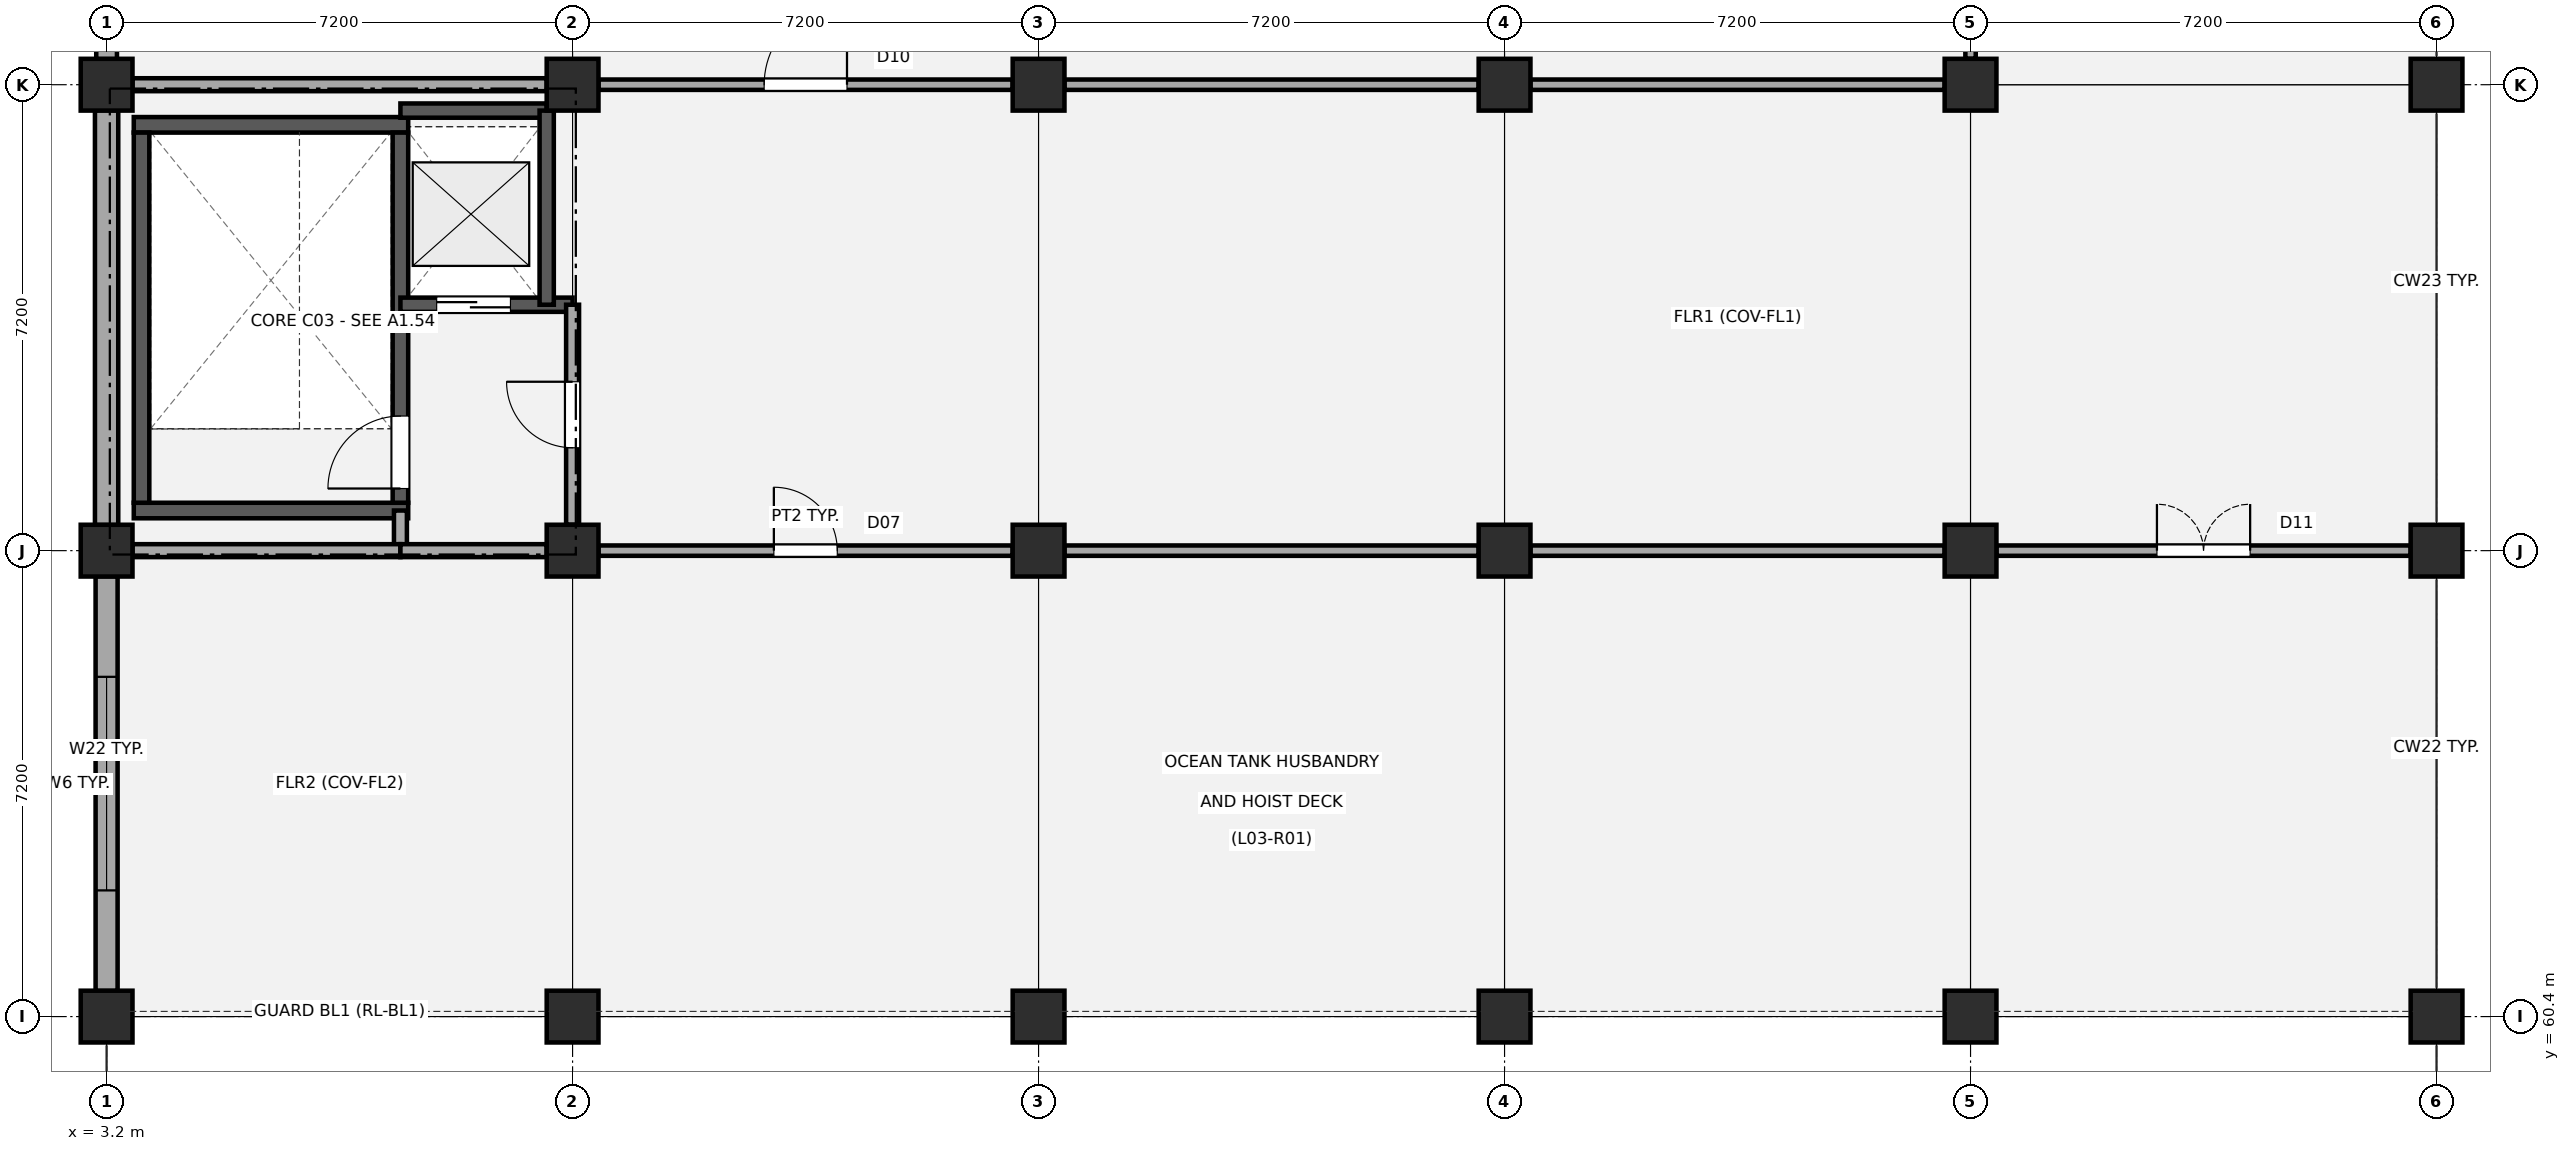
"""IFC4 building model, lengths in metres.
Left out: names, types, materials, properties, quantities, classifications, styles, units other than length and angle.
Written with IfcOpenShell. Run it as: python <this file> out.ifc"""

import sys

from ifc_helpers import new_model, si_unit, direction, frame, frame_2d, origin, origin_2d, place, context, subcontext, project, spatial, rectangle, extrude, element, fill, save


model = new_model("IFC4")
c1 = context("Model", 3, precision=1e-05, world=origin(), true_north=direction((0.0, 1.0)))
c2 = subcontext(c1, "Body", "Model", "MODEL_VIEW")
j1 = project(units=[si_unit("LENGTHUNIT", "METRE"), si_unit("PLANEANGLEUNIT", "RADIAN")], contexts=[c1])
p1 = place(None, origin())
s1 = spatial("IfcSite", under=j1, at=p1, CompositionType="ELEMENT")
p2 = place(p1, origin())
s2 = spatial("IfcBuilding", under=s1, at=p2, CompositionType="ELEMENT")
p3 = place(p2, frame((0.0, 0.0, 13.5)))
s3 = spatial("IfcBuildingStorey", under=s2, at=p3, CompositionType="ELEMENT", Elevation=13.5)
for number, where, z_axis, x_axis in (
    (1, (3.2, 60.4, 0.0), (0.0, 0.0, 1.0), (1.0, 0.0, 0.0)),
    (2, (3.2, 67.6, 0.0), (0.0, 0.0, 1.0), (1.0, 0.0, 0.0)),
    (3, (3.2, 74.8, 0.0), (0.0, 0.0, 1.0), (1.0, 0.0, 0.0)),
    (4, (10.4, 60.4, 0.0), (0.0, 0.0, 1.0), (1.0, 0.0, 0.0)),
    (5, (10.4, 67.6, 0.0), (0.0, 0.0, 1.0), (1.0, 0.0, 0.0)),
    (6, (10.4, 74.8, 0.0), (0.0, 0.0, 1.0), (1.0, 0.0, 0.0)),
    (7, (17.6, 60.4, 0.0), (0.0, 0.0, 1.0), (1.0, 0.0, 0.0)),
    (8, (17.6, 67.6, 0.0), (0.0, 0.0, 1.0), (1.0, 0.0, 0.0)),
    (9, (17.6, 74.8, 0.0), (0.0, 0.0, 1.0), (1.0, 0.0, 0.0)),
    (10, (24.8, 60.4, 0.0), (0.0, 0.0, 1.0), (1.0, 0.0, 0.0)),
    (11, (24.8, 67.6, 0.0), (0.0, 0.0, 1.0), (1.0, 0.0, 0.0)),
    (12, (24.8, 74.8, 0.0), (0.0, 0.0, 1.0), (1.0, 0.0, 0.0)),
    (13, (32.0, 60.4, 0.0), (0.0, 0.0, 1.0), (1.0, 0.0, 0.0)),
    (14, (32.0, 67.6, 0.0), (0.0, 0.0, 1.0), (1.0, 0.0, 0.0)),
    (15, (32.0, 74.8, 0.0), (0.0, 0.0, 1.0), (1.0, 0.0, 0.0)),
    (16, (39.2, 60.4, 0.0), (0.0, 0.0, 1.0), (1.0, 0.0, 0.0)),
    (17, (39.2, 67.6, 0.0), (0.0, 0.0, 1.0), (1.0, 0.0, 0.0)),
    (18, (39.2, 74.8, 0.0), (0.0, 0.0, 1.0), (1.0, 0.0, 0.0)),
):
    element("IfcColumn", number, at=place(p3, frame(where, z_axis=z_axis, x_axis=x_axis)), inside=s3, PredefinedType="COLUMN", context=c2, shape_type="SweptSolid", body=[
        extrude(rectangle(XDim=0.8, YDim=0.8, at=origin_2d()), origin(), (0.0, 0.0, 1.0), 4.14),
    ])
p4 = place(p3, frame((3.2, 60.795, 0.0), z_axis=(0.0, 0.0, 1.0), x_axis=(0.0, 1.0, 0.0)))
e19 = element("IfcWall", 19, at=p4, inside=s3, PredefinedType="STANDARD", context=c2, shape_type="SweptSolid", body=[
    extrude(rectangle(XDim=6.41, YDim=0.34, at=frame_2d((3.205, 0.0))), origin(), (0.0, 0.0, 1.0), 3.53),
])
p5 = place(p4, frame((1.555, 0.0, 0.95)))
e20 = element("IfcOpeningElement", 20, at=p5, cuts=e19, PredefinedType="OPENING", context=c2, shape_type="SweptSolid", body=[
    extrude(rectangle(XDim=3.3, YDim=1.95, at=frame_2d((1.65, 0.975))), frame((0.0, 0.18, 0.0), z_axis=(0.0, -1.0, 0.0), x_axis=(1.0, 0.0, 0.0)), (0.0, 0.0, 1.0), 0.36),
])
p6 = place(p3, frame((3.2, 67.995, 0.0), z_axis=(0.0, 0.0, 1.0), x_axis=(0.0, 1.0, 0.0)))
e21 = element("IfcWall", 21, at=p6, inside=s3, PredefinedType="STANDARD", context=c2, shape_type="SweptSolid", body=[
    extrude(rectangle(XDim=6.41, YDim=0.36, at=frame_2d((3.205, 0.0))), origin(), (0.0, 0.0, 1.0), 3.53),
])
p7 = place(p3, frame((3.2, 75.195, 0.0), z_axis=(0.0, 0.0, 1.0), x_axis=(0.0, 1.0, 0.0)))
e22 = element("IfcWall", 22, at=p7, inside=s3, PredefinedType="STANDARD", context=c2, shape_type="SweptSolid", body=[
    extrude(rectangle(XDim=6.41, YDim=0.32, at=frame_2d((3.205, 0.0))), origin(), (0.0, 0.0, 1.0), 3.53),
])
p8 = place(p7, frame((1.48, 0.0, 0.95)))
e23 = element("IfcOpeningElement", 23, at=p8, cuts=e22, PredefinedType="OPENING", context=c2, shape_type="SweptSolid", body=[
    extrude(rectangle(XDim=3.45, YDim=2.0, at=frame_2d((1.725, 1.0))), frame((0.0, 0.17, 0.0), z_axis=(0.0, -1.0, 0.0), x_axis=(1.0, 0.0, 0.0)), (0.0, 0.0, 1.0), 0.34),
])
for number, where, z_axis, x_axis in (
    (24, (3.62, 68.22, 0.0), (0.0, 0.0, 1.0), (1.0, 0.0, 0.0)),
    (25, (3.62, 74.18, 0.0), (0.0, 0.0, 1.0), (1.0, 0.0, 0.0)),
):
    element("IfcWall", number, at=place(p3, frame(where, z_axis=z_axis, x_axis=x_axis)), inside=s3, PredefinedType="SHEAR", context=c2, shape_type="SweptSolid", body=[
        extrude(rectangle(XDim=4.24, YDim=0.24, at=frame_2d((2.12, 0.0))), origin(), (0.0, 0.0, 1.0), 3.84),
    ])
p9 = place(p3, frame((3.74, 68.34, 0.0), z_axis=(0.0, 0.0, 1.0), x_axis=(0.0, 1.0, 0.0)))
e26 = element("IfcWall", 26, at=p9, inside=s3, PredefinedType="SHEAR", context=c2, shape_type="SweptSolid", body=[
    extrude(rectangle(XDim=5.72, YDim=0.24, at=frame_2d((2.86, 0.0))), origin(), (0.0, 0.0, 1.0), 3.84),
])
p10 = place(p3, frame((7.74, 68.34, 0.0), z_axis=(0.0, 0.0, 1.0), x_axis=(0.0, 1.0, 0.0)))
e27 = element("IfcWall", 27, at=p10, inside=s3, PredefinedType="SHEAR", context=c2, shape_type="SweptSolid", body=[
    extrude(rectangle(XDim=5.72, YDim=0.24, at=frame_2d((2.86, 0.0))), origin(), (0.0, 0.0, 1.0), 3.84),
])
p11 = place(p10, frame((0.22, 0.0, 0.0)))
e28 = element("IfcOpeningElement", 28, at=p11, cuts=e27, PredefinedType="OPENING", context=c2, shape_type="SweptSolid", body=[
    extrude(rectangle(XDim=1.12, YDim=2.15, at=frame_2d((0.56, 1.075))), frame((0.0, 0.13, 0.0), z_axis=(0.0, -1.0, 0.0), x_axis=(1.0, 0.0, 0.0)), (0.0, 0.0, 1.0), 0.26),
])
p12 = place(p3, frame((7.74, 71.4, 0.0), z_axis=(0.0, 0.0, 1.0), x_axis=(1.0, 0.0, 0.0)))
e29 = element("IfcWall", 29, at=p12, inside=s3, PredefinedType="SHEAR", context=c2, shape_type="SweptSolid", body=[
    extrude(rectangle(XDim=2.66, YDim=0.22, at=frame_2d((1.33, 0.0))), origin(), (0.0, 0.0, 1.0), 3.84),
])
p13 = place(p12, frame((0.56, 0.0, 0.0)))
e30 = element("IfcOpeningElement", 30, at=p13, cuts=e29, PredefinedType="OPENING", context=c2, shape_type="SweptSolid", body=[
    extrude(rectangle(XDim=1.14, YDim=2.15, at=frame_2d((0.57, 1.075))), frame((0.0, 0.12, 0.0), z_axis=(0.0, -1.0, 0.0), x_axis=(1.0, 0.0, 0.0)), (0.0, 0.0, 1.0), 0.24),
])
p14 = place(p3, frame((7.74, 74.4, 0.0), z_axis=(0.0, 0.0, 1.0), x_axis=(1.0, 0.0, 0.0)))
e31 = element("IfcWall", 31, at=p14, inside=s3, PredefinedType="SHEAR", context=c2, shape_type="SweptSolid", body=[
    extrude(rectangle(XDim=2.26, YDim=0.22, at=frame_2d((1.13, 0.0))), origin(), (0.0, 0.0, 1.0), 3.84),
])
p15 = place(p3, frame((10.0, 71.4, 0.0), z_axis=(0.0, 0.0, 1.0), x_axis=(0.0, 1.0, 0.0)))
e32 = element("IfcWall", 32, at=p15, inside=s3, PredefinedType="SHEAR", context=c2, shape_type="SweptSolid", body=[
    extrude(rectangle(XDim=3.0, YDim=0.22, at=frame_2d((1.5, 0.0))), origin(), (0.0, 0.0, 1.0), 3.84),
])
p16 = place(p3, frame((7.74, 67.6, 0.0), z_axis=(0.0, 0.0, 1.0), x_axis=(0.0, 1.0, 0.0)))
e33 = element("IfcWall", 33, at=p16, inside=s3, PredefinedType="PARTITIONING", context=c2, shape_type="SweptSolid", body=[
    extrude(rectangle(XDim=0.62, YDim=0.2, at=frame_2d((0.31, 0.0))), origin(), (0.0, 0.0, 1.0), 3.82),
])
p17 = place(p3, frame((10.4, 68.0, 0.0), z_axis=(0.0, 0.0, 1.0), x_axis=(0.0, 1.0, 0.0)))
e34 = element("IfcWall", 34, at=p17, inside=s3, PredefinedType="PARTITIONING", context=c2, shape_type="SweptSolid", body=[
    extrude(rectangle(XDim=3.4, YDim=0.2, at=frame_2d((1.7, 0.0))), origin(), (0.0, 0.0, 1.0), 3.82),
])
p18 = place(p17, frame((1.19, 0.0, 0.0)))
e35 = element("IfcOpeningElement", 35, at=p18, cuts=e34, PredefinedType="OPENING", context=c2, shape_type="SweptSolid", body=[
    extrude(rectangle(XDim=1.02, YDim=2.15, at=frame_2d((0.51, 1.075))), frame((0.0, 0.11, 0.0), z_axis=(0.0, -1.0, 0.0), x_axis=(1.0, 0.0, 0.0)), (0.0, 0.0, 1.0), 0.22),
])
p19 = place(p3, frame((3.6, 67.6, 0.0), z_axis=(0.0, 0.0, 1.0), x_axis=(1.0, 0.0, 0.0)))
e36 = element("IfcWall", 36, at=p19, inside=s3, PredefinedType="PARTITIONING", context=c2, shape_type="SweptSolid", body=[
    extrude(rectangle(XDim=4.14, YDim=0.2, at=frame_2d((2.07, 0.0))), origin(), (0.0, 0.0, 1.0), 3.82),
])
p20 = place(p3, frame((7.74, 67.6, 0.0), z_axis=(0.0, 0.0, 1.0), x_axis=(1.0, 0.0, 0.0)))
e37 = element("IfcWall", 37, at=p20, inside=s3, PredefinedType="PARTITIONING", context=c2, shape_type="SweptSolid", body=[
    extrude(rectangle(XDim=2.26, YDim=0.2, at=frame_2d((1.13, 0.0))), origin(), (0.0, 0.0, 1.0), 3.82),
])
p21 = place(p3, frame((3.6, 74.8, 0.0), z_axis=(0.0, 0.0, 1.0), x_axis=(1.0, 0.0, 0.0)))
e38 = element("IfcWall", 38, at=p21, inside=s3, PredefinedType="PARTITIONING", context=c2, shape_type="SweptSolid", body=[
    extrude(rectangle(XDim=6.4, YDim=0.2, at=frame_2d((3.2, 0.0))), origin(), (0.0, 0.0, 1.0), 3.82),
])
p22 = place(p3, frame((10.8, 67.6, 0.0), z_axis=(0.0, 0.0, 1.0), x_axis=(1.0, 0.0, 0.0)))
e39 = element("IfcWall", 39, at=p22, inside=s3, PredefinedType="PARTITIONING", context=c2, shape_type="SweptSolid", body=[
    extrude(rectangle(XDim=6.4, YDim=0.16, at=frame_2d((3.2, 0.0))), origin(), (0.0, 0.0, 1.0), 3.82),
])
p23 = place(p22, frame((2.71, 0.0, 0.0)))
e40 = element("IfcOpeningElement", 40, at=p23, cuts=e39, PredefinedType="OPENING", context=c2, shape_type="SweptSolid", body=[
    extrude(rectangle(XDim=0.98, YDim=2.12, at=frame_2d((0.49, 1.06))), frame((0.0, 0.09, 0.0), z_axis=(0.0, -1.0, 0.0), x_axis=(1.0, 0.0, 0.0)), (0.0, 0.0, 1.0), 0.18),
])
p24 = place(p3, frame((10.8, 74.8, 0.0), z_axis=(0.0, 0.0, 1.0), x_axis=(1.0, 0.0, 0.0)))
e41 = element("IfcWall", 41, at=p24, inside=s3, PredefinedType="PARTITIONING", context=c2, shape_type="SweptSolid", body=[
    extrude(rectangle(XDim=6.4, YDim=0.16, at=frame_2d((3.2, 0.0))), origin(), (0.0, 0.0, 1.0), 3.82),
])
p25 = place(p24, frame((2.56, 0.0, 0.0)))
e42 = element("IfcOpeningElement", 42, at=p25, cuts=e41, PredefinedType="OPENING", context=c2, shape_type="SweptSolid", body=[
    extrude(rectangle(XDim=1.28, YDim=2.2, at=frame_2d((0.64, 1.1))), frame((0.0, 0.09, 0.0), z_axis=(0.0, -1.0, 0.0), x_axis=(1.0, 0.0, 0.0)), (0.0, 0.0, 1.0), 0.18),
])
for number, where, z_axis, x_axis in (
    (43, (18.0, 67.6, 0.0), (0.0, 0.0, 1.0), (1.0, 0.0, 0.0)),
    (44, (18.0, 74.8, 0.0), (0.0, 0.0, 1.0), (1.0, 0.0, 0.0)),
):
    element("IfcWall", number, at=place(p3, frame(where, z_axis=z_axis, x_axis=x_axis)), inside=s3, PredefinedType="PARTITIONING", context=c2, shape_type="SweptSolid", body=[
        extrude(rectangle(XDim=6.4, YDim=0.16, at=frame_2d((3.2, 0.0))), origin(), (0.0, 0.0, 1.0), 3.82),
    ])
for number, where, z_axis, x_axis in (
    (45, (25.2, 67.6, 0.0), (0.0, 0.0, 1.0), (1.0, 0.0, 0.0)),
    (46, (25.2, 74.8, 0.0), (0.0, 0.0, 1.0), (1.0, 0.0, 0.0)),
):
    element("IfcWall", number, at=place(p3, frame(where, z_axis=z_axis, x_axis=x_axis)), inside=s3, PredefinedType="PARTITIONING", context=c2, shape_type="SweptSolid", body=[
        extrude(rectangle(XDim=6.4, YDim=0.16, at=frame_2d((3.2, 0.0))), origin(), (0.0, 0.0, 1.0), 3.82),
    ])
p26 = place(p3, frame((32.0, 75.2, 0.0), z_axis=(0.0, 0.0, 1.0), x_axis=(0.0, 1.0, 0.0)))
e47 = element("IfcWall", 47, at=p26, inside=s3, PredefinedType="PARTITIONING", context=c2, shape_type="SweptSolid", body=[
    extrude(rectangle(XDim=6.4, YDim=0.16, at=frame_2d((3.2, 0.0))), origin(), (0.0, 0.0, 1.0), 3.82),
])
p27 = place(p26, frame((2.71, 0.0, 0.0)))
e48 = element("IfcOpeningElement", 48, at=p27, cuts=e47, PredefinedType="OPENING", context=c2, shape_type="SweptSolid", body=[
    extrude(rectangle(XDim=0.98, YDim=2.12, at=frame_2d((0.49, 1.06))), frame((0.0, 0.09, 0.0), z_axis=(0.0, -1.0, 0.0), x_axis=(1.0, 0.0, 0.0)), (0.0, 0.0, 1.0), 0.18),
])
p28 = place(p3, frame((32.4, 67.6, 0.0), z_axis=(0.0, 0.0, 1.0), x_axis=(1.0, 0.0, 0.0)))
e49 = element("IfcWall", 49, at=p28, inside=s3, PredefinedType="PARTITIONING", context=c2, shape_type="SweptSolid", body=[
    extrude(rectangle(XDim=6.4, YDim=0.16, at=frame_2d((3.2, 0.0))), origin(), (0.0, 0.0, 1.0), 3.82),
])
p29 = place(p28, frame((2.48, 0.0, 0.0)))
e50 = element("IfcOpeningElement", 50, at=p29, cuts=e49, PredefinedType="OPENING", context=c2, shape_type="SweptSolid", body=[
    extrude(rectangle(XDim=1.44, YDim=2.2, at=frame_2d((0.72, 1.1))), frame((0.0, 0.09, 0.0), z_axis=(0.0, -1.0, 0.0), x_axis=(1.0, 0.0, 0.0)), (0.0, 0.0, 1.0), 0.18),
])
p30 = place(p5, origin())
e51 = element("IfcWindow", 51, at=p30, inside=s3, PartitioningType="SINGLE_PANEL", PredefinedType="WINDOW", context=c2, shape_type="SweptSolid", body=[
    extrude(rectangle(XDim=3.3, YDim=1.95, at=frame_2d((1.65, 0.975))), frame((0.0, 0.03, 0.0), z_axis=(0.0, -1.0, 0.0), x_axis=(1.0, 0.0, 0.0)), (0.0, 0.0, 1.0), 0.06),
])
fill(e20, e51)
p31 = place(p11, origin())
e52 = element("IfcDoor", 52, at=p31, inside=s3, OperationType="SINGLE_SWING_LEFT", PredefinedType="DOOR", context=c2, shape_type="SweptSolid", body=[
    extrude(rectangle(XDim=1.12, YDim=2.15, at=frame_2d((0.56, 1.075))), frame((0.0, 0.025, 0.0), z_axis=(0.0, -1.0, 0.0), x_axis=(1.0, 0.0, 0.0)), (0.0, 0.0, 1.0), 0.05),
])
fill(e28, e52)
p32 = place(p13, origin())
e53 = element("IfcDoor", 53, at=p32, inside=s3, OperationType="SLIDING_TO_LEFT", PredefinedType="DOOR", context=c2, shape_type="SweptSolid", body=[
    extrude(rectangle(XDim=1.14, YDim=2.15, at=frame_2d((0.57, 1.075))), frame((0.0, 0.025, 0.0), z_axis=(0.0, -1.0, 0.0), x_axis=(1.0, 0.0, 0.0)), (0.0, 0.0, 1.0), 0.05),
])
fill(e30, e53)
p33 = place(p18, origin())
e54 = element("IfcDoor", 54, at=p33, inside=s3, OperationType="SINGLE_SWING_RIGHT", PredefinedType="DOOR", context=c2, shape_type="SweptSolid", body=[
    extrude(rectangle(XDim=1.02, YDim=2.15, at=frame_2d((0.51, 1.075))), frame((0.0, 0.025, 0.0), z_axis=(0.0, -1.0, 0.0), x_axis=(1.0, 0.0, 0.0)), (0.0, 0.0, 1.0), 0.05),
])
fill(e35, e54)
p34 = place(p23, origin())
e55 = element("IfcDoor", 55, at=p34, inside=s3, OperationType="SINGLE_SWING_LEFT", PredefinedType="DOOR", context=c2, shape_type="SweptSolid", body=[
    extrude(rectangle(XDim=0.98, YDim=2.12, at=frame_2d((0.49, 1.06))), frame((0.0, 0.025, 0.0), z_axis=(0.0, -1.0, 0.0), x_axis=(1.0, 0.0, 0.0)), (0.0, 0.0, 1.0), 0.05),
])
fill(e40, e55)
p35 = place(p29, origin())
e56 = element("IfcDoor", 56, at=p35, inside=s3, OperationType="DOUBLE_DOOR_SINGLE_SWING", PredefinedType="DOOR", context=c2, shape_type="SweptSolid", body=[
    extrude(rectangle(XDim=1.44, YDim=2.2, at=frame_2d((0.72, 1.1))), frame((0.0, 0.025, 0.0), z_axis=(0.0, -1.0, 0.0), x_axis=(1.0, 0.0, 0.0)), (0.0, 0.0, 1.0), 0.05),
])
fill(e50, e56)
p36 = place(p25, origin())
e57 = element("IfcDoor", 57, at=p36, inside=s3, OperationType="SINGLE_SWING_RIGHT", PredefinedType="DOOR", context=c2, shape_type="SweptSolid", body=[
    extrude(rectangle(XDim=1.28, YDim=2.2, at=frame_2d((0.64, 1.1))), frame((0.0, 0.025, 0.0), z_axis=(0.0, -1.0, 0.0), x_axis=(1.0, 0.0, 0.0)), (0.0, 0.0, 1.0), 0.05),
])
fill(e42, e57)
save(model, sys.argv[1])
